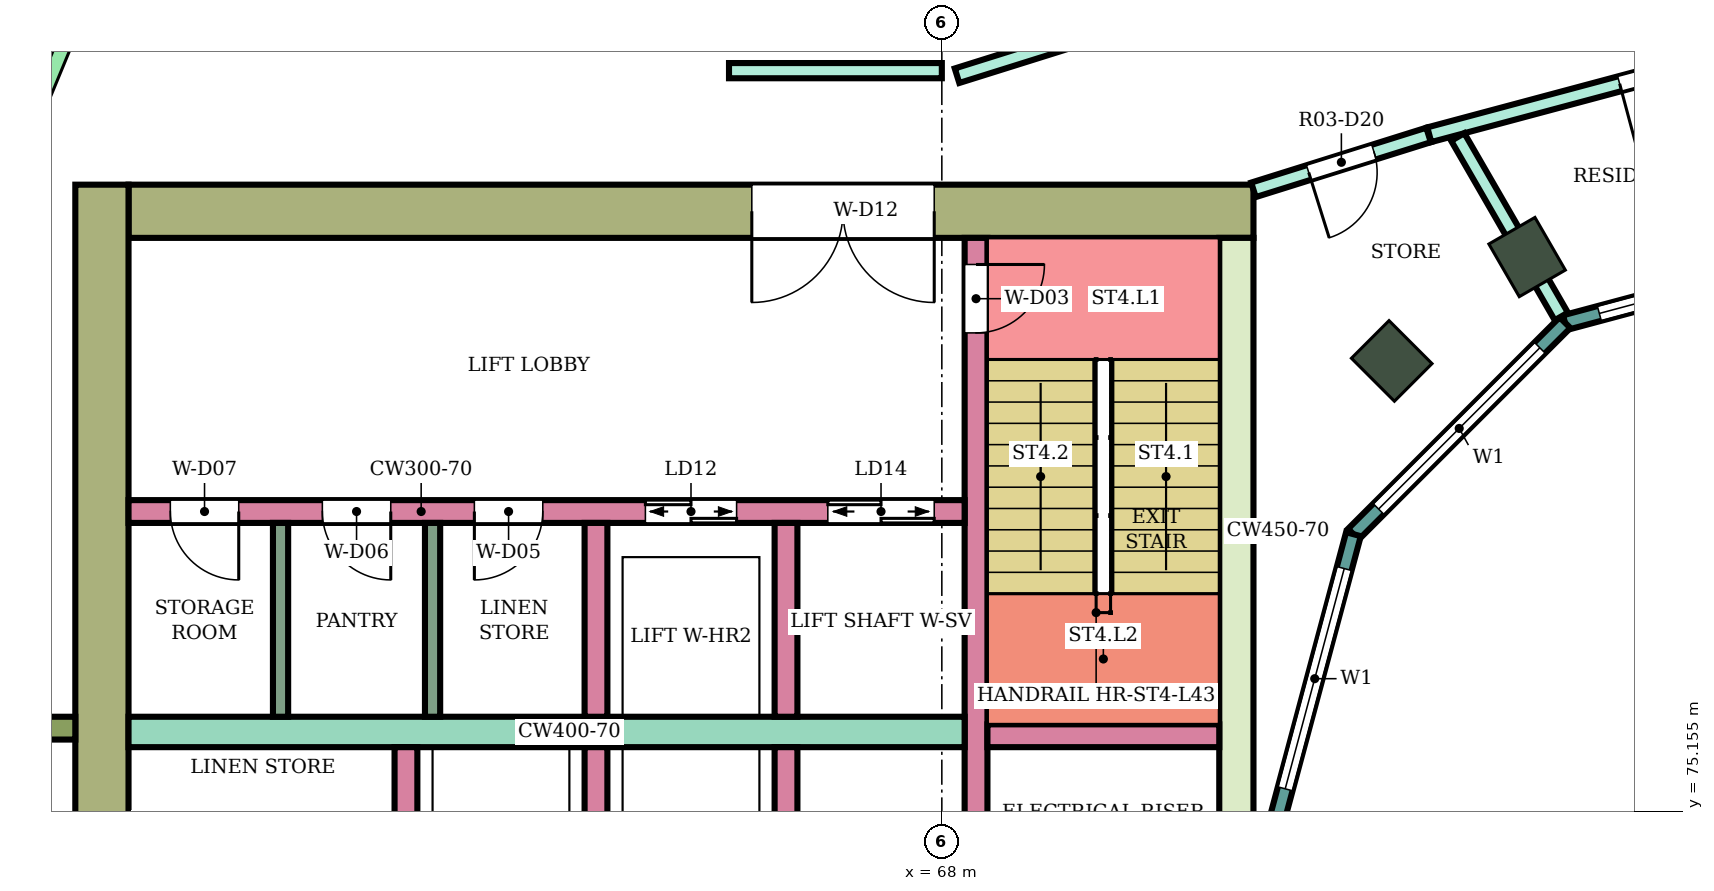
"""IFC4 building model, lengths in metres.
Left out: names, types, materials, properties, quantities, classifications, styles, units other than length and angle.
Written with IfcOpenShell. Run it as: python <this file> out.ifc"""

import sys

from ifc_helpers import new_model, si_unit, direction, frame, frame_2d, origin, origin_2d, place, context, subcontext, project, spatial, rectangle, extrude, element, fill, save


model = new_model("IFC4")
c1 = context("Model", 3, precision=1e-05, world=origin(), true_north=direction((0.0, 1.0)))
c2 = subcontext(c1, "Body", "Model", "MODEL_VIEW")
j1 = project(units=[si_unit("LENGTHUNIT", "METRE"), si_unit("PLANEANGLEUNIT", "RADIAN")], contexts=[c1])
p1 = place(None, origin())
s1 = spatial("IfcSite", under=j1, at=p1, CompositionType="ELEMENT")
p2 = place(p1, origin())
s2 = spatial("IfcBuilding", under=s1, at=p2, CompositionType="ELEMENT")
p3 = place(p2, frame((0.0, 0.0, 186.4)))
s3 = spatial("IfcBuildingStorey", under=s2, at=p3, CompositionType="ELEMENT", Elevation=186.4)
for number, where, z_axis, x_axis in (
    (1, (75.7, 82.448, 0.0), (0.0, 0.0, 1.0), (-0.5, 0.866, 0.0)),
    (2, (73.919, 81.081, 0.0), (0.0, 0.0, 1.0), (-0.707, 0.707, 0.0)),
):
    element("IfcColumn", number, at=place(p3, frame(where, z_axis=z_axis, x_axis=x_axis)), inside=s3, PredefinedType="COLUMN", context=c2, shape_type="SweptSolid", body=[
        extrude(rectangle(XDim=0.8, YDim=0.7, at=origin_2d()), origin(), (0.0, 0.0, 1.0), 4.1),
    ])
p4 = place(p3, frame((72.1, 83.05, 0.0), z_axis=(0.0, 0.0, 1.0), x_axis=(-1.0, 0.0, 0.0)))
e3 = element("IfcWall", 3, at=p4, inside=s3, PredefinedType="SHEAR", context=c2, shape_type="SweptSolid", body=[
    extrude(rectangle(XDim=14.8, YDim=0.7, at=frame_2d((7.4, 0.0))), origin(), (0.0, 0.0, 1.0), 3.78),
])
p5 = place(p4, frame((4.2, 0.0, 0.0)))
e4 = element("IfcOpeningElement", 4, at=p5, cuts=e3, PredefinedType="OPENING", context=c2, shape_type="SweptSolid", body=[
    extrude(rectangle(XDim=2.4, YDim=2.4, at=frame_2d((1.2, 1.2))), frame((0.0, 0.36, 0.0), z_axis=(0.0, -1.0, 0.0), x_axis=(1.0, 0.0, 0.0)), (0.0, 0.0, 1.0), 0.72),
])
p6 = place(p3, frame((71.875, 82.7, 0.0), z_axis=(0.0, 0.0, 1.0), x_axis=(0.0, -1.0, 0.0)))
e5 = element("IfcWall", 5, at=p6, inside=s3, PredefinedType="SHEAR", context=c2, shape_type="SweptSolid", body=[
    extrude(rectangle(XDim=7.7, YDim=0.45, at=frame_2d((3.85, 0.0))), origin(), (0.0, 0.0, 1.0), 3.78),
])
p7 = place(p3, frame((56.95, 83.4, 0.0), z_axis=(0.0, 0.0, 1.0), x_axis=(0.0, -1.0, 0.0)))
e6 = element("IfcWall", 6, at=p7, inside=s3, PredefinedType="SHEAR", context=c2, shape_type="SweptSolid", body=[
    extrude(rectangle(XDim=16.8, YDim=0.7, at=frame_2d((8.4, 0.0))), origin(), (0.0, 0.0, 1.0), 3.78),
])
p8 = place(p3, frame((68.45, 82.7, 0.0), z_axis=(0.0, 0.0, 1.0), x_axis=(0.0, -1.0, 0.0)))
e7 = element("IfcWall", 7, at=p8, inside=s3, PredefinedType="SHEAR", context=c2, shape_type="SweptSolid", body=[
    extrude(rectangle(XDim=7.7, YDim=0.3, at=frame_2d((3.85, 0.0))), origin(), (0.0, 0.0, 1.0), 3.78),
])
p9 = place(p8, frame((0.35, 0.0, 0.0)))
e8 = element("IfcOpeningElement", 8, at=p9, cuts=e7, PredefinedType="OPENING", context=c2, shape_type="SweptSolid", body=[
    extrude(rectangle(XDim=0.9, YDim=2.1, at=frame_2d((0.45, 1.05))), frame((0.0, 0.16, 0.0), z_axis=(0.0, -1.0, 0.0), x_axis=(1.0, 0.0, 0.0)), (0.0, 0.0, 1.0), 0.32),
])
p10 = place(p3, frame((71.65, 76.15, 0.0), z_axis=(0.0, 0.0, 1.0), x_axis=(-1.0, 0.0, 0.0)))
e9 = element("IfcWall", 9, at=p10, inside=s3, PredefinedType="SHEAR", context=c2, shape_type="SweptSolid", body=[
    extrude(rectangle(XDim=3.05, YDim=0.3, at=frame_2d((1.525, 0.0))), origin(), (0.0, 0.0, 1.0), 3.78),
])
p11 = place(p3, frame((68.3, 76.2, 0.0), z_axis=(0.0, 0.0, 1.0), x_axis=(-1.0, 0.0, 0.0)))
e10 = element("IfcWall", 10, at=p11, inside=s3, PredefinedType="SHEAR", context=c2, shape_type="SweptSolid", body=[
    extrude(rectangle(XDim=11.0, YDim=0.4, at=frame_2d((5.5, 0.0))), origin(), (0.0, 0.0, 1.0), 3.78),
])
p12 = place(p3, frame((68.3, 79.1, 0.0), z_axis=(0.0, 0.0, 1.0), x_axis=(-1.0, 0.0, 0.0)))
e11 = element("IfcWall", 11, at=p12, inside=s3, PredefinedType="SHEAR", context=c2, shape_type="SweptSolid", body=[
    extrude(rectangle(XDim=11.0, YDim=0.3, at=frame_2d((5.5, 0.0))), origin(), (0.0, 0.0, 1.0), 3.78),
])
p13 = place(p12, frame((0.4, 0.0, 0.0)))
e12 = element("IfcOpeningElement", 12, at=p13, cuts=e11, PredefinedType="OPENING", context=c2, shape_type="SweptSolid", body=[
    extrude(rectangle(XDim=1.4, YDim=2.1, at=frame_2d((0.7, 1.05))), frame((0.0, 0.16, 0.0), z_axis=(0.0, -1.0, 0.0), x_axis=(1.0, 0.0, 0.0)), (0.0, 0.0, 1.0), 0.32),
])
p14 = place(p12, frame((3.0, 0.0, 0.0)))
e13 = element("IfcOpeningElement", 13, at=p14, cuts=e11, PredefinedType="OPENING", context=c2, shape_type="SweptSolid", body=[
    extrude(rectangle(XDim=1.2, YDim=2.1, at=frame_2d((0.6, 1.05))), frame((0.0, 0.16, 0.0), z_axis=(0.0, -1.0, 0.0), x_axis=(1.0, 0.0, 0.0)), (0.0, 0.0, 1.0), 0.32),
])
p15 = place(p12, frame((5.55, 0.0, 0.0)))
e14 = element("IfcOpeningElement", 14, at=p15, cuts=e11, PredefinedType="OPENING", context=c2, shape_type="SweptSolid", body=[
    extrude(rectangle(XDim=0.9, YDim=2.1, at=frame_2d((0.45, 1.05))), frame((0.0, 0.16, 0.0), z_axis=(0.0, -1.0, 0.0), x_axis=(1.0, 0.0, 0.0)), (0.0, 0.0, 1.0), 0.32),
])
p16 = place(p12, frame((7.55, 0.0, 0.0)))
e15 = element("IfcOpeningElement", 15, at=p16, cuts=e11, PredefinedType="OPENING", context=c2, shape_type="SweptSolid", body=[
    extrude(rectangle(XDim=0.9, YDim=2.1, at=frame_2d((0.45, 1.05))), frame((0.0, 0.16, 0.0), z_axis=(0.0, -1.0, 0.0), x_axis=(1.0, 0.0, 0.0)), (0.0, 0.0, 1.0), 0.32),
])
p17 = place(p12, frame((9.55, 0.0, 0.0)))
e16 = element("IfcOpeningElement", 16, at=p17, cuts=e11, PredefinedType="OPENING", context=c2, shape_type="SweptSolid", body=[
    extrude(rectangle(XDim=0.9, YDim=2.1, at=frame_2d((0.45, 1.05))), frame((0.0, 0.16, 0.0), z_axis=(0.0, -1.0, 0.0), x_axis=(1.0, 0.0, 0.0)), (0.0, 0.0, 1.0), 0.32),
])
for number, where, z_axis, x_axis in (
    (17, (65.95, 76.0, 0.0), (0.0, 0.0, 1.0), (0.0, -1.0, 0.0)),
    (18, (63.45, 76.0, 0.0), (0.0, 0.0, 1.0), (0.0, -1.0, 0.0)),
    (19, (60.95, 76.0, 0.0), (0.0, 0.0, 1.0), (0.0, -1.0, 0.0)),
    (20, (65.95, 78.95, 0.0), (0.0, 0.0, 1.0), (0.0, -1.0, 0.0)),
    (21, (63.45, 78.95, 0.0), (0.0, 0.0, 1.0), (0.0, -1.0, 0.0)),
):
    element("IfcWall", number, at=place(p3, frame(where, z_axis=z_axis, x_axis=x_axis)), inside=s3, PredefinedType="SHEAR", context=c2, shape_type="SweptSolid", body=[
        extrude(rectangle(XDim=2.55, YDim=0.3, at=frame_2d((1.275, 0.0))), origin(), (0.0, 0.0, 1.0), 3.78),
    ])
p18 = place(p3, frame((56.6, 76.25, 0.0), z_axis=(0.0, 0.0, 1.0), x_axis=(-1.0, 0.0, 0.0)))
e22 = element("IfcWall", 22, at=p18, inside=s3, PredefinedType="NOTDEFINED", context=c2, shape_type="SweptSolid", body=[
    extrude(rectangle(XDim=2.416, YDim=0.3, at=frame_2d((1.208, 0.0))), origin(), (0.0, 0.0, 1.0), 4.1),
])
p19 = place(p3, frame((80.0, 82.604, 0.0), z_axis=(0.0, 0.0, 1.0), x_axis=(-0.965933654434, -0.258789828301, 0.0)))
e23 = element("IfcWall", 23, at=p19, inside=s3, PredefinedType="NOTDEFINED", context=c2, shape_type="SweptSolid", body=[
    extrude(rectangle(XDim=3.936, YDim=0.2, at=frame_2d((1.968, 0.0))), origin(), (0.0, 0.0, 1.0), 4.1),
])
p20 = place(p19, frame((0.468, 0.0, 0.9)))
e24 = element("IfcOpeningElement", 24, at=p20, cuts=e23, PredefinedType="OPENING", context=c2, shape_type="SweptSolid", body=[
    extrude(rectangle(XDim=3.0, YDim=2.3, at=frame_2d((1.5, 1.15))), frame((0.0, 0.11, 0.0), z_axis=(0.0, -1.0, 0.0), x_axis=(1.0, 0.0, 0.0)), (0.0, 0.0, 1.0), 0.22),
])
p21 = place(p3, frame((76.198, 81.585, 0.0), z_axis=(0.0, 0.0, 1.0), x_axis=(-0.707106781187, -0.707106781187, 0.0)))
e25 = element("IfcWall", 25, at=p21, inside=s3, PredefinedType="NOTDEFINED", context=c2, shape_type="SweptSolid", body=[
    extrude(rectangle(XDim=3.936, YDim=0.2, at=frame_2d((1.968, 0.0))), origin(), (0.0, 0.0, 1.0), 4.1),
])
p22 = place(p21, frame((0.468, 0.0, 0.9)))
e26 = element("IfcOpeningElement", 26, at=p22, cuts=e25, PredefinedType="OPENING", context=c2, shape_type="SweptSolid", body=[
    extrude(rectangle(XDim=3.0, YDim=2.3, at=frame_2d((1.5, 1.15))), frame((0.0, 0.11, 0.0), z_axis=(0.0, -1.0, 0.0), x_axis=(1.0, 0.0, 0.0)), (0.0, 0.0, 1.0), 0.22),
])
p23 = place(p3, frame((73.415, 78.802, 0.0), z_axis=(0.0, 0.0, 1.0), x_axis=(-0.258789828301, -0.965933654434, 0.0)))
e27 = element("IfcWall", 27, at=p23, inside=s3, PredefinedType="NOTDEFINED", context=c2, shape_type="SweptSolid", body=[
    extrude(rectangle(XDim=3.936, YDim=0.2, at=frame_2d((1.968, 0.0))), origin(), (0.0, 0.0, 1.0), 4.1),
])
p24 = place(p23, frame((0.468, 0.0, 0.9)))
e28 = element("IfcOpeningElement", 28, at=p24, cuts=e27, PredefinedType="OPENING", context=c2, shape_type="SweptSolid", body=[
    extrude(rectangle(XDim=3.0, YDim=2.3, at=frame_2d((1.5, 1.15))), frame((0.0, 0.11, 0.0), z_axis=(0.0, -1.0, 0.0), x_axis=(1.0, 0.0, 0.0)), (0.0, 0.0, 1.0), 0.22),
])
p25 = place(p3, frame((65.2, 84.9, 0.0), z_axis=(0.0, 0.0, 1.0), x_axis=(1.0, 0.0, 0.0)))
e29 = element("IfcWall", 29, at=p25, inside=s3, PredefinedType="PARTITIONING", context=c2, shape_type="SweptSolid", body=[
    extrude(rectangle(XDim=2.8, YDim=0.2, at=frame_2d((1.4, 0.0))), origin(), (0.0, 0.0, 1.0), 3.65),
])
p26 = place(p3, frame((68.2, 84.833, 0.0), z_axis=(0.0, 0.0, 1.0), x_axis=(0.954204109499, 0.299156342762, 0.0)))
e30 = element("IfcWall", 30, at=p26, inside=s3, PredefinedType="PARTITIONING", context=c2, shape_type="SweptSolid", body=[
    extrude(rectangle(XDim=5.74, YDim=0.2, at=frame_2d((2.87, 0.0))), origin(), (0.0, 0.0, 1.0), 3.65),
])
p27 = place(p26, frame((3.903, 0.0, 0.0)))
e31 = element("IfcOpeningElement", 31, at=p27, cuts=e30, PredefinedType="OPENING", context=c2, shape_type="SweptSolid", body=[
    extrude(rectangle(XDim=1.0, YDim=2.1, at=frame_2d((0.5, 1.05))), frame((0.0, 0.11, 0.0), z_axis=(0.0, -1.0, 0.0), x_axis=(1.0, 0.0, 0.0)), (0.0, 0.0, 1.0), 0.22),
])
p28 = place(p3, frame((72.1, 83.332, 0.0), z_axis=(0.0, 0.0, 1.0), x_axis=(0.954233106619, 0.299063836383, 0.0)))
e32 = element("IfcWall", 32, at=p28, inside=s3, PredefinedType="PARTITIONING", context=c2, shape_type="SweptSolid", body=[
    extrude(rectangle(XDim=2.414, YDim=0.2, at=frame_2d((1.207, 0.0))), origin(), (0.0, 0.0, 1.0), 3.65),
])
p29 = place(p28, frame((0.762, 0.0, 0.0)))
e33 = element("IfcOpeningElement", 33, at=p29, cuts=e32, PredefinedType="OPENING", context=c2, shape_type="SweptSolid", body=[
    extrude(rectangle(XDim=0.9, YDim=2.1, at=frame_2d((0.45, 1.05))), frame((0.0, 0.11, 0.0), z_axis=(0.0, -1.0, 0.0), x_axis=(1.0, 0.0, 0.0)), (0.0, 0.0, 1.0), 0.22),
])
p30 = place(p3, frame((74.413, 84.057, 0.0), z_axis=(0.0, 0.0, 1.0), x_axis=(0.965972135939, 0.258646153246, 0.0)))
e34 = element("IfcWall", 34, at=p30, inside=s3, PredefinedType="PARTITIONING", context=c2, shape_type="SweptSolid", body=[
    extrude(rectangle(XDim=5.654, YDim=0.2, at=frame_2d((2.827, 0.0))), origin(), (0.0, 0.0, 1.0), 3.65),
])
p31 = place(p30, frame((2.593, 0.0, 0.0)))
e35 = element("IfcOpeningElement", 35, at=p31, cuts=e34, PredefinedType="OPENING", context=c2, shape_type="SweptSolid", body=[
    extrude(rectangle(XDim=0.9, YDim=2.1, at=frame_2d((0.45, 1.05))), frame((0.0, 0.11, 0.0), z_axis=(0.0, -1.0, 0.0), x_axis=(1.0, 0.0, 0.0)), (0.0, 0.0, 1.0), 0.22),
])
p32 = place(p3, frame((74.788, 84.027, 0.0), z_axis=(0.0, 0.0, 1.0), x_axis=(0.499905962189, -0.866079689733, 0.0)))
e36 = element("IfcWall", 36, at=p32, inside=s3, PredefinedType="PARTITIONING", context=c2, shape_type="SweptSolid", body=[
    extrude(rectangle(XDim=2.726, YDim=0.2, at=frame_2d((1.363, 0.0))), origin(), (0.0, 0.0, 1.0), 3.65),
])
for number, where, z_axis, x_axis in (
    (37, (61.3, 78.95, 0.0), (0.0, 0.0, 1.0), (0.0, -1.0, 0.0)),
    (38, (59.3, 78.95, 0.0), (0.0, 0.0, 1.0), (0.0, -1.0, 0.0)),
):
    element("IfcWall", number, at=place(p3, frame(where, z_axis=z_axis, x_axis=x_axis)), inside=s3, PredefinedType="PARTITIONING", context=c2, shape_type="SweptSolid", body=[
        extrude(rectangle(XDim=2.55, YDim=0.2, at=frame_2d((1.275, 0.0))), origin(), (0.0, 0.0, 1.0), 3.78),
    ])
p33 = place(p20, origin())
e39 = element("IfcWindow", 39, at=p33, inside=s3, PartitioningType="SINGLE_PANEL", PredefinedType="WINDOW", context=c2, shape_type="SweptSolid", body=[
    extrude(rectangle(XDim=3.0, YDim=2.3, at=frame_2d((1.5, 1.15))), frame((0.0, 0.03, 0.0), z_axis=(0.0, -1.0, 0.0), x_axis=(1.0, 0.0, 0.0)), (0.0, 0.0, 1.0), 0.06),
])
fill(e24, e39)
p34 = place(p22, origin())
e40 = element("IfcWindow", 40, at=p34, inside=s3, PartitioningType="SINGLE_PANEL", PredefinedType="WINDOW", context=c2, shape_type="SweptSolid", body=[
    extrude(rectangle(XDim=3.0, YDim=2.3, at=frame_2d((1.5, 1.15))), frame((0.0, 0.03, 0.0), z_axis=(0.0, -1.0, 0.0), x_axis=(1.0, 0.0, 0.0)), (0.0, 0.0, 1.0), 0.06),
])
fill(e26, e40)
p35 = place(p24, origin())
e41 = element("IfcWindow", 41, at=p35, inside=s3, PartitioningType="SINGLE_PANEL", PredefinedType="WINDOW", context=c2, shape_type="SweptSolid", body=[
    extrude(rectangle(XDim=3.0, YDim=2.3, at=frame_2d((1.5, 1.15))), frame((0.0, 0.03, 0.0), z_axis=(0.0, -1.0, 0.0), x_axis=(1.0, 0.0, 0.0)), (0.0, 0.0, 1.0), 0.06),
])
fill(e28, e41)
p36 = place(p31, frame((0.9, 0.0, 0.0), z_axis=(0.0, 0.0, 1.0), x_axis=(-1.0, 0.0, 0.0)))
e42 = element("IfcDoor", 42, at=p36, inside=s3, OperationType="SINGLE_SWING_RIGHT", PredefinedType="DOOR", context=c2, shape_type="SweptSolid", body=[
    extrude(rectangle(XDim=0.9, YDim=2.1, at=frame_2d((0.45, 1.05))), frame((0.0, 0.025, 0.0), z_axis=(0.0, -1.0, 0.0), x_axis=(1.0, 0.0, 0.0)), (0.0, 0.0, 1.0), 0.05),
])
fill(e35, e42)
p37 = place(p29, frame((0.9, 0.0, 0.0), z_axis=(0.0, 0.0, 1.0), x_axis=(-1.0, 0.0, 0.0)))
e43 = element("IfcDoor", 43, at=p37, inside=s3, OperationType="SINGLE_SWING_RIGHT", PredefinedType="DOOR", context=c2, shape_type="SweptSolid", body=[
    extrude(rectangle(XDim=0.9, YDim=2.1, at=frame_2d((0.45, 1.05))), frame((0.0, 0.025, 0.0), z_axis=(0.0, -1.0, 0.0), x_axis=(1.0, 0.0, 0.0)), (0.0, 0.0, 1.0), 0.05),
])
fill(e33, e43)
p38 = place(p9, origin())
e44 = element("IfcDoor", 44, at=p38, inside=s3, OperationType="SINGLE_SWING_LEFT", PredefinedType="DOOR", context=c2, shape_type="SweptSolid", body=[
    extrude(rectangle(XDim=0.9, YDim=2.1, at=frame_2d((0.45, 1.05))), frame((0.0, 0.025, 0.0), z_axis=(0.0, -1.0, 0.0), x_axis=(1.0, 0.0, 0.0)), (0.0, 0.0, 1.0), 0.05),
])
fill(e8, e44)
p39 = place(p13, origin())
e45 = element("IfcDoor", 45, at=p39, inside=s3, OperationType="DOUBLE_DOOR_SLIDING", PredefinedType="DOOR", context=c2, shape_type="SweptSolid", body=[
    extrude(rectangle(XDim=1.4, YDim=2.1, at=frame_2d((0.7, 1.05))), frame((0.0, 0.025, 0.0), z_axis=(0.0, -1.0, 0.0), x_axis=(1.0, 0.0, 0.0)), (0.0, 0.0, 1.0), 0.05),
])
fill(e12, e45)
p40 = place(p14, origin())
e46 = element("IfcDoor", 46, at=p40, inside=s3, OperationType="DOUBLE_DOOR_SLIDING", PredefinedType="DOOR", context=c2, shape_type="SweptSolid", body=[
    extrude(rectangle(XDim=1.2, YDim=2.1, at=frame_2d((0.6, 1.05))), frame((0.0, 0.025, 0.0), z_axis=(0.0, -1.0, 0.0), x_axis=(1.0, 0.0, 0.0)), (0.0, 0.0, 1.0), 0.05),
])
fill(e13, e46)
p41 = place(p15, origin())
e47 = element("IfcDoor", 47, at=p41, inside=s3, OperationType="SINGLE_SWING_RIGHT", PredefinedType="DOOR", context=c2, shape_type="SweptSolid", body=[
    extrude(rectangle(XDim=0.9, YDim=2.1, at=frame_2d((0.45, 1.05))), frame((0.0, 0.025, 0.0), z_axis=(0.0, -1.0, 0.0), x_axis=(1.0, 0.0, 0.0)), (0.0, 0.0, 1.0), 0.05),
])
fill(e14, e47)
p42 = place(p16, origin())
e48 = element("IfcDoor", 48, at=p42, inside=s3, OperationType="SINGLE_SWING_LEFT", PredefinedType="DOOR", context=c2, shape_type="SweptSolid", body=[
    extrude(rectangle(XDim=0.9, YDim=2.1, at=frame_2d((0.45, 1.05))), frame((0.0, 0.025, 0.0), z_axis=(0.0, -1.0, 0.0), x_axis=(1.0, 0.0, 0.0)), (0.0, 0.0, 1.0), 0.05),
])
fill(e15, e48)
p43 = place(p17, origin())
e49 = element("IfcDoor", 49, at=p43, inside=s3, OperationType="SINGLE_SWING_LEFT", PredefinedType="DOOR", context=c2, shape_type="SweptSolid", body=[
    extrude(rectangle(XDim=0.9, YDim=2.1, at=frame_2d((0.45, 1.05))), frame((0.0, 0.025, 0.0), z_axis=(0.0, -1.0, 0.0), x_axis=(1.0, 0.0, 0.0)), (0.0, 0.0, 1.0), 0.05),
])
fill(e16, e49)
p44 = place(p5, origin())
e50 = element("IfcDoor", 50, at=p44, inside=s3, OperationType="DOUBLE_DOOR_SINGLE_SWING", PredefinedType="DOOR", context=c2, shape_type="SweptSolid", body=[
    extrude(rectangle(XDim=2.4, YDim=2.4, at=frame_2d((1.2, 1.2))), frame((0.0, 0.025, 0.0), z_axis=(0.0, -1.0, 0.0), x_axis=(1.0, 0.0, 0.0)), (0.0, 0.0, 1.0), 0.05),
])
fill(e4, e50)
save(model, sys.argv[1])
